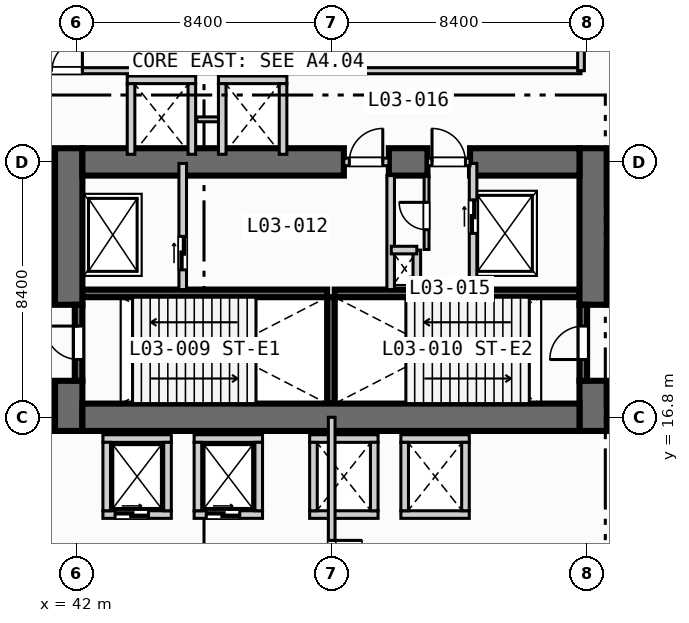
"""IFC4 building model, lengths in metres.
Left out: names, types, materials, properties, quantities, classifications, styles, units other than length and angle.
Written with IfcOpenShell. Run it as: python <this file> out.ifc"""

import sys

from ifc_helpers import new_model, si_unit, direction, frame, frame_2d, origin, place, context, subcontext, project, spatial, rectangle, extrude, element, fill, save


model = new_model("IFC4")
c1 = context("Model", 3, precision=1e-05, world=origin(), true_north=direction((0.0, 1.0)))
c2 = subcontext(c1, "Body", "Model", "MODEL_VIEW")
j1 = project(units=[si_unit("LENGTHUNIT", "METRE"), si_unit("PLANEANGLEUNIT", "RADIAN")], contexts=[c1])
p1 = place(None, origin())
s1 = spatial("IfcSite", under=j1, at=p1, CompositionType="ELEMENT")
p2 = place(p1, origin())
s2 = spatial("IfcBuilding", under=s1, at=p2, CompositionType="ELEMENT")
p3 = place(p2, frame((0.0, 0.0, 15.6)))
s3 = spatial("IfcBuildingStorey", under=s2, at=p3, CompositionType="ELEMENT", Elevation=15.6)
for number, where, z_axis, x_axis in (
    (1, (42.2, 20.875, 0.0), (0.0, 0.0, 1.0), (1.0, 0.0, 0.0)),
    (2, (50.5, 20.875, 0.0), (0.0, 0.0, 1.0), (1.0, 0.0, 0.0)),
):
    element("IfcWall", number, at=place(p3, frame(where, z_axis=z_axis, x_axis=x_axis)), inside=s3, PredefinedType="SOLIDWALL", context=c2, shape_type="SweptSolid", body=[
        extrude(rectangle(XDim=8.05, YDim=0.25, at=frame_2d((4.025, 0.0))), origin(), (0.0, 0.0, 1.0), 4.85),
    ])
p4 = place(p3, frame((50.375, 17.25, 0.0), z_axis=(0.0, 0.0, 1.0), x_axis=(0.0, 1.0, 0.0)))
e3 = element("IfcWall", 3, at=p4, inside=s3, PredefinedType="SOLIDWALL", context=c2, shape_type="SweptSolid", body=[
    extrude(rectangle(XDim=3.5, YDim=0.25, at=frame_2d((1.75, 0.0))), origin(), (0.0, 0.0, 1.0), 4.85),
])
p5 = place(p3, frame((41.75, 16.35, 0.0), z_axis=(0.0, 0.0, 1.0), x_axis=(0.0, 1.0, 0.0)))
e4 = element("IfcWall", 4, at=p5, inside=s3, PredefinedType="SHEAR", context=c2, shape_type="SweptSolid", body=[
    extrude(rectangle(XDim=1.65, YDim=0.9, at=frame_2d((0.825, 0.0))), origin(), (0.0, 0.0, 1.0), 4.85),
])
p6 = place(p3, frame((41.75, 20.5, 0.0), z_axis=(0.0, 0.0, 1.0), x_axis=(0.0, 1.0, 0.0)))
e5 = element("IfcWall", 5, at=p6, inside=s3, PredefinedType="SHEAR", context=c2, shape_type="SweptSolid", body=[
    extrude(rectangle(XDim=5.15, YDim=0.9, at=frame_2d((2.575, 0.0))), origin(), (0.0, 0.0, 1.0), 4.85),
])
p7 = place(p3, frame((59.0, 16.35, 0.0), z_axis=(0.0, 0.0, 1.0), x_axis=(0.0, 1.0, 0.0)))
e6 = element("IfcWall", 6, at=p7, inside=s3, PredefinedType="SHEAR", context=c2, shape_type="SweptSolid", body=[
    extrude(rectangle(XDim=1.65, YDim=0.9, at=frame_2d((0.825, 0.0))), origin(), (0.0, 0.0, 1.0), 4.85),
])
p8 = place(p3, frame((59.0, 20.5, 0.0), z_axis=(0.0, 0.0, 1.0), x_axis=(0.0, 1.0, 0.0)))
e7 = element("IfcWall", 7, at=p8, inside=s3, PredefinedType="SHEAR", context=c2, shape_type="SweptSolid", body=[
    extrude(rectangle(XDim=5.15, YDim=0.9, at=frame_2d((2.575, 0.0))), origin(), (0.0, 0.0, 1.0), 4.85),
])
p9 = place(p3, frame((42.2, 16.8, 0.0), z_axis=(0.0, 0.0, 1.0), x_axis=(1.0, 0.0, 0.0)))
e8 = element("IfcWall", 8, at=p9, inside=s3, PredefinedType="SHEAR", context=c2, shape_type="SweptSolid", body=[
    extrude(rectangle(XDim=16.35, YDim=0.9, at=frame_2d((8.175, 0.0))), origin(), (0.0, 0.0, 1.0), 4.85),
])
p10 = place(p3, frame((42.2, 25.2, 0.0), z_axis=(0.0, 0.0, 1.0), x_axis=(1.0, 0.0, 0.0)))
e9 = element("IfcWall", 9, at=p10, inside=s3, PredefinedType="SHEAR", context=c2, shape_type="SweptSolid", body=[
    extrude(rectangle(XDim=8.6, YDim=0.9, at=frame_2d((4.3, 0.0))), origin(), (0.0, 0.0, 1.0), 4.85),
])
p11 = place(p3, frame((52.28, 25.2, 0.0), z_axis=(0.0, 0.0, 1.0), x_axis=(1.0, 0.0, 0.0)))
e10 = element("IfcWall", 10, at=p11, inside=s3, PredefinedType="SHEAR", context=c2, shape_type="SweptSolid", body=[
    extrude(rectangle(XDim=1.27, YDim=0.9, at=frame_2d((0.635, 0.0))), origin(), (0.0, 0.0, 1.0), 4.85),
])
p12 = place(p3, frame((54.95, 25.2, 0.0), z_axis=(0.0, 0.0, 1.0), x_axis=(1.0, 0.0, 0.0)))
e11 = element("IfcWall", 11, at=p12, inside=s3, PredefinedType="SHEAR", context=c2, shape_type="SweptSolid", body=[
    extrude(rectangle(XDim=3.6, YDim=0.9, at=frame_2d((1.8, 0.0))), origin(), (0.0, 0.0, 1.0), 4.85),
])
p13 = place(p3, frame((42.075, 18.0, 0.0), z_axis=(0.0, 0.0, 1.0), x_axis=(0.0, 1.0, 0.0)))
e12 = element("IfcWall", 12, at=p13, inside=s3, PredefinedType="SOLIDWALL", context=c2, shape_type="SweptSolid", body=[
    extrude(rectangle(XDim=2.5, YDim=0.25, at=frame_2d((1.25, 0.0))), origin(), (0.0, 0.0, 1.0), 4.85),
])
p14 = place(p13, frame((0.7, 0.0, 0.0)))
e13 = element("IfcOpeningElement", 13, at=p14, cuts=e12, PredefinedType="OPENING", context=c2, shape_type="SweptSolid", body=[
    extrude(rectangle(XDim=1.1, YDim=2.15, at=frame_2d((0.55, 1.075))), frame((0.0, 0.135, 0.0), z_axis=(0.0, -1.0, 0.0), x_axis=(1.0, 0.0, 0.0)), (0.0, 0.0, 1.0), 0.27),
])
p15 = place(p3, frame((58.675, 18.0, 0.0), z_axis=(0.0, 0.0, 1.0), x_axis=(0.0, 1.0, 0.0)))
e14 = element("IfcWall", 14, at=p15, inside=s3, PredefinedType="SOLIDWALL", context=c2, shape_type="SweptSolid", body=[
    extrude(rectangle(XDim=2.5, YDim=0.25, at=frame_2d((1.25, 0.0))), origin(), (0.0, 0.0, 1.0), 4.85),
])
p16 = place(p15, frame((0.7, 0.0, 0.0)))
e15 = element("IfcOpeningElement", 15, at=p16, cuts=e14, PredefinedType="OPENING", context=c2, shape_type="SweptSolid", body=[
    extrude(rectangle(XDim=1.1, YDim=2.15, at=frame_2d((0.55, 1.075))), frame((0.0, 0.135, 0.0), z_axis=(0.0, -1.0, 0.0), x_axis=(1.0, 0.0, 0.0)), (0.0, 0.0, 1.0), 0.27),
])
p17 = place(p3, frame((45.5, 21.0, 0.0), z_axis=(0.0, 0.0, 1.0), x_axis=(0.0, 1.0, 0.0)))
e16 = element("IfcWall", 16, at=p17, inside=s3, PredefinedType="SOLIDWALL", context=c2, shape_type="SweptSolid", body=[
    extrude(rectangle(XDim=4.15, YDim=0.25, at=frame_2d((2.075, 0.0))), origin(), (0.0, 0.0, 1.0), 4.85),
])
p18 = place(p17, frame((0.65, 0.0, 0.0)))
e17 = element("IfcOpeningElement", 17, at=p18, cuts=e16, PredefinedType="OPENING", context=c2, shape_type="SweptSolid", body=[
    extrude(rectangle(XDim=1.1, YDim=2.15, at=frame_2d((0.55, 1.075))), frame((0.0, 0.135, 0.0), z_axis=(0.0, -1.0, 0.0), x_axis=(1.0, 0.0, 0.0)), (0.0, 0.0, 1.0), 0.27),
])
p19 = place(p3, frame((50.8, 25.2, 0.0), z_axis=(0.0, 0.0, 1.0), x_axis=(1.0, 0.0, 0.0)))
e18 = element("IfcWall", 18, at=p19, inside=s3, PredefinedType="SOLIDWALL", context=c2, shape_type="SweptSolid", body=[
    extrude(rectangle(XDim=1.48, YDim=0.25, at=frame_2d((0.74, 0.0))), origin(), (0.0, 0.0, 1.0), 4.85),
])
p20 = place(p19, frame((0.18, 0.0, 0.0)))
e19 = element("IfcOpeningElement", 19, at=p20, cuts=e18, PredefinedType="OPENING", context=c2, shape_type="SweptSolid", body=[
    extrude(rectangle(XDim=1.1, YDim=2.15, at=frame_2d((0.55, 1.075))), frame((0.0, 0.135, 0.0), z_axis=(0.0, -1.0, 0.0), x_axis=(1.0, 0.0, 0.0)), (0.0, 0.0, 1.0), 0.27),
])
p21 = place(p3, frame((52.34, 21.0, 0.0), z_axis=(0.0, 0.0, 1.0), x_axis=(0.0, 1.0, 0.0)))
e20 = element("IfcWall", 20, at=p21, inside=s3, PredefinedType="SOLIDWALL", context=c2, shape_type="SweptSolid", body=[
    extrude(rectangle(XDim=3.75, YDim=0.25, at=frame_2d((1.875, 0.0))), origin(), (0.0, 0.0, 1.0), 4.85),
])
p22 = place(p3, frame((55.05, 21.0, 0.0), z_axis=(0.0, 0.0, 1.0), x_axis=(0.0, 1.0, 0.0)))
e21 = element("IfcWall", 21, at=p22, inside=s3, PredefinedType="SOLIDWALL", context=c2, shape_type="SweptSolid", body=[
    extrude(rectangle(XDim=4.15, YDim=0.25, at=frame_2d((2.075, 0.0))), origin(), (0.0, 0.0, 1.0), 4.85),
])
p23 = place(p22, frame((1.85, 0.0, 0.0)))
e22 = element("IfcOpeningElement", 22, at=p23, cuts=e21, PredefinedType="OPENING", context=c2, shape_type="SweptSolid", body=[
    extrude(rectangle(XDim=1.1, YDim=2.15, at=frame_2d((0.55, 1.075))), frame((0.0, 0.135, 0.0), z_axis=(0.0, -1.0, 0.0), x_axis=(1.0, 0.0, 0.0)), (0.0, 0.0, 1.0), 0.27),
])
p24 = place(p3, frame((53.55, 25.2, 0.0), z_axis=(0.0, 0.0, 1.0), x_axis=(1.0, 0.0, 0.0)))
e23 = element("IfcWall", 23, at=p24, inside=s3, PredefinedType="SOLIDWALL", context=c2, shape_type="SweptSolid", body=[
    extrude(rectangle(XDim=1.4, YDim=0.25, at=frame_2d((0.7, 0.0))), origin(), (0.0, 0.0, 1.0), 4.85),
])
p25 = place(p24, frame((0.15, 0.0, 0.0)))
e24 = element("IfcOpeningElement", 24, at=p25, cuts=e23, PredefinedType="OPENING", context=c2, shape_type="SweptSolid", body=[
    extrude(rectangle(XDim=1.1, YDim=2.15, at=frame_2d((0.55, 1.075))), frame((0.0, 0.135, 0.0), z_axis=(0.0, -1.0, 0.0), x_axis=(1.0, 0.0, 0.0)), (0.0, 0.0, 1.0), 0.27),
])
p26 = place(p3, frame((53.2, 21.0, 0.0), z_axis=(0.0, 0.0, 1.0), x_axis=(0.0, 1.0, 0.0)))
e25 = element("IfcWall", 25, at=p26, inside=s3, PredefinedType="SOLIDWALL", context=c2, shape_type="SweptSolid", body=[
    extrude(rectangle(XDim=1.3, YDim=0.25, at=frame_2d((0.65, 0.0))), origin(), (0.0, 0.0, 1.0), 4.85),
])
p27 = place(p3, frame((52.36, 22.3, 0.0), z_axis=(0.0, 0.0, 1.0), x_axis=(1.0, 0.0, 0.0)))
e26 = element("IfcWall", 26, at=p27, inside=s3, PredefinedType="SOLIDWALL", context=c2, shape_type="SweptSolid", body=[
    extrude(rectangle(XDim=0.84, YDim=0.25, at=frame_2d((0.42, 0.0))), origin(), (0.0, 0.0, 1.0), 4.85),
])
p28 = place(p3, frame((53.52, 22.32, 0.0), z_axis=(0.0, 0.0, 1.0), x_axis=(0.0, 1.0, 0.0)))
e27 = element("IfcWall", 27, at=p28, inside=s3, PredefinedType="PARTITIONING", context=c2, shape_type="SweptSolid", body=[
    extrude(rectangle(XDim=2.4, YDim=0.16, at=frame_2d((1.2, 0.0))), origin(), (0.0, 0.0, 1.0), 4.85),
])
p29 = place(p28, frame((0.65, 0.0, 0.0)))
e28 = element("IfcOpeningElement", 28, at=p29, cuts=e27, PredefinedType="OPENING", context=c2, shape_type="SweptSolid", body=[
    extrude(rectangle(XDim=0.9, YDim=2.1, at=frame_2d((0.45, 1.05))), frame((0.0, 0.09, 0.0), z_axis=(0.0, -1.0, 0.0), x_axis=(1.0, 0.0, 0.0)), (0.0, 0.0, 1.0), 0.18),
])
p30 = place(p3, frame((42.875, 13.6, 0.0), z_axis=(0.0, 0.0, 1.0), x_axis=(1.0, 0.0, 0.0)))
e29 = element("IfcWall", 29, at=p30, inside=s3, PredefinedType="SOLIDWALL", context=c2, shape_type="SweptSolid", body=[
    extrude(rectangle(XDim=2.25, YDim=0.25, at=frame_2d((1.125, 0.0))), origin(), (0.0, 0.0, 1.0), 4.85),
])
p31 = place(p30, frame((0.4, 0.0, 0.0)))
e30 = element("IfcOpeningElement", 30, at=p31, cuts=e29, PredefinedType="OPENING", context=c2, shape_type="SweptSolid", body=[
    extrude(rectangle(XDim=1.1, YDim=2.15, at=frame_2d((0.55, 1.075))), frame((0.0, 0.135, 0.0), z_axis=(0.0, -1.0, 0.0), x_axis=(1.0, 0.0, 0.0)), (0.0, 0.0, 1.0), 0.27),
])
for number, where, z_axis, x_axis in (
    (31, (42.875, 16.1, 0.0), (0.0, 0.0, 1.0), (1.0, 0.0, 0.0)),
    (32, (43.0, 13.725, 0.0), (0.0, 0.0, 1.0), (0.0, 1.0, 0.0)),
    (33, (45.0, 13.725, 0.0), (0.0, 0.0, 1.0), (0.0, 1.0, 0.0)),
):
    element("IfcWall", number, at=place(p3, frame(where, z_axis=z_axis, x_axis=x_axis)), inside=s3, PredefinedType="SOLIDWALL", context=c2, shape_type="SweptSolid", body=[
        extrude(rectangle(XDim=2.25, YDim=0.25, at=frame_2d((1.125, 0.0))), origin(), (0.0, 0.0, 1.0), 4.85),
    ])
p32 = place(p3, frame((45.875, 13.6, 0.0), z_axis=(0.0, 0.0, 1.0), x_axis=(1.0, 0.0, 0.0)))
e34 = element("IfcWall", 34, at=p32, inside=s3, PredefinedType="SOLIDWALL", context=c2, shape_type="SweptSolid", body=[
    extrude(rectangle(XDim=2.25, YDim=0.25, at=frame_2d((1.125, 0.0))), origin(), (0.0, 0.0, 1.0), 4.85),
])
p33 = place(p32, frame((0.4, 0.0, 0.0)))
e35 = element("IfcOpeningElement", 35, at=p33, cuts=e34, PredefinedType="OPENING", context=c2, shape_type="SweptSolid", body=[
    extrude(rectangle(XDim=1.1, YDim=2.15, at=frame_2d((0.55, 1.075))), frame((0.0, 0.135, 0.0), z_axis=(0.0, -1.0, 0.0), x_axis=(1.0, 0.0, 0.0)), (0.0, 0.0, 1.0), 0.27),
])
for number, where, z_axis, x_axis in (
    (36, (45.875, 16.1, 0.0), (0.0, 0.0, 1.0), (1.0, 0.0, 0.0)),
    (37, (46.0, 13.725, 0.0), (0.0, 0.0, 1.0), (0.0, 1.0, 0.0)),
    (38, (48.0, 13.725, 0.0), (0.0, 0.0, 1.0), (0.0, 1.0, 0.0)),
    (39, (49.675, 13.6, 0.0), (0.0, 0.0, 1.0), (1.0, 0.0, 0.0)),
    (40, (49.675, 16.1, 0.0), (0.0, 0.0, 1.0), (1.0, 0.0, 0.0)),
    (41, (49.8, 13.725, 0.0), (0.0, 0.0, 1.0), (0.0, 1.0, 0.0)),
    (42, (51.8, 13.725, 0.0), (0.0, 0.0, 1.0), (0.0, 1.0, 0.0)),
    (43, (52.675, 13.6, 0.0), (0.0, 0.0, 1.0), (1.0, 0.0, 0.0)),
    (44, (52.675, 16.1, 0.0), (0.0, 0.0, 1.0), (1.0, 0.0, 0.0)),
    (45, (52.8, 13.725, 0.0), (0.0, 0.0, 1.0), (0.0, 1.0, 0.0)),
    (46, (54.8, 13.725, 0.0), (0.0, 0.0, 1.0), (0.0, 1.0, 0.0)),
    (47, (43.675, 27.9, 0.0), (0.0, 0.0, 1.0), (1.0, 0.0, 0.0)),
):
    element("IfcWall", number, at=place(p3, frame(where, z_axis=z_axis, x_axis=x_axis)), inside=s3, PredefinedType="SOLIDWALL", context=c2, shape_type="SweptSolid", body=[
        extrude(rectangle(XDim=2.25, YDim=0.25, at=frame_2d((1.125, 0.0))), origin(), (0.0, 0.0, 1.0), 4.85),
    ])
for number, where, z_axis, x_axis in (
    (48, (43.8, 25.45, 0.0), (0.0, 0.0, 1.0), (0.0, 1.0, 0.0)),
    (49, (45.8, 25.45, 0.0), (0.0, 0.0, 1.0), (0.0, 1.0, 0.0)),
):
    element("IfcWall", number, at=place(p3, frame(where, z_axis=z_axis, x_axis=x_axis)), inside=s3, PredefinedType="SOLIDWALL", context=c2, shape_type="SweptSolid", body=[
        extrude(rectangle(XDim=2.325, YDim=0.25, at=frame_2d((1.163, 0.0))), origin(), (0.0, 0.0, 1.0), 4.85),
    ])
p34 = place(p3, frame((45.96, 26.6, 0.0), z_axis=(0.0, 0.0, 1.0), x_axis=(1.0, 0.0, 0.0)))
e50 = element("IfcWall", 50, at=p34, inside=s3, PredefinedType="PARTITIONING", context=c2, shape_type="SweptSolid", body=[
    extrude(rectangle(XDim=0.88, YDim=0.16, at=frame_2d((0.44, 0.0))), origin(), (0.0, 0.0, 1.0), 4.85),
])
p35 = place(p3, frame((46.675, 27.9, 0.0), z_axis=(0.0, 0.0, 1.0), x_axis=(1.0, 0.0, 0.0)))
e51 = element("IfcWall", 51, at=p35, inside=s3, PredefinedType="SOLIDWALL", context=c2, shape_type="SweptSolid", body=[
    extrude(rectangle(XDim=2.25, YDim=0.25, at=frame_2d((1.125, 0.0))), origin(), (0.0, 0.0, 1.0), 4.85),
])
for number, where, z_axis, x_axis in (
    (52, (46.8, 25.45, 0.0), (0.0, 0.0, 1.0), (0.0, 1.0, 0.0)),
    (53, (48.8, 25.45, 0.0), (0.0, 0.0, 1.0), (0.0, 1.0, 0.0)),
):
    element("IfcWall", number, at=place(p3, frame(where, z_axis=z_axis, x_axis=x_axis)), inside=s3, PredefinedType="SOLIDWALL", context=c2, shape_type="SweptSolid", body=[
        extrude(rectangle(XDim=2.325, YDim=0.25, at=frame_2d((1.163, 0.0))), origin(), (0.0, 0.0, 1.0), 4.85),
    ])
p36 = place(p3, frame((50.4, 0.35, 0.0), z_axis=(0.0, 0.0, 1.0), x_axis=(0.0, 1.0, 0.0)))
e54 = element("IfcWall", 54, at=p36, inside=s3, PredefinedType="PARTITIONING", context=c2, shape_type="SweptSolid", body=[
    extrude(rectangle(XDim=16.45, YDim=0.22, at=frame_2d((8.225, 0.0))), origin(), (0.0, 0.0, 1.0), 4.0),
])
p37 = place(p36, frame((3.2, 0.0, 0.0)))
e55 = element("IfcOpeningElement", 55, at=p37, cuts=e54, PredefinedType="OPENING", context=c2, shape_type="SweptSolid", body=[
    extrude(rectangle(XDim=2.0, YDim=2.15, at=frame_2d((1.0, 1.075))), frame((0.0, 0.12, 0.0), z_axis=(0.0, -1.0, 0.0), x_axis=(1.0, 0.0, 0.0)), (0.0, 0.0, 1.0), 0.24),
])
p38 = place(p36, frame((10.4, 0.0, 0.0)))
e56 = element("IfcOpeningElement", 56, at=p38, cuts=e54, PredefinedType="OPENING", context=c2, shape_type="SweptSolid", body=[
    extrude(rectangle(XDim=2.0, YDim=2.15, at=frame_2d((1.0, 1.075))), frame((0.0, 0.12, 0.0), z_axis=(0.0, -1.0, 0.0), x_axis=(1.0, 0.0, 0.0)), (0.0, 0.0, 1.0), 0.24),
])
p39 = place(p3, frame((34.2, 28.2, 0.0), z_axis=(0.0, 0.0, 1.0), x_axis=(1.0, 0.0, 0.0)))
e57 = element("IfcWall", 57, at=p39, inside=s3, PredefinedType="PARTITIONING", context=c2, shape_type="SweptSolid", body=[
    extrude(rectangle(XDim=24.4, YDim=0.2, at=frame_2d((12.2, 0.0))), origin(), (0.0, 0.0, 1.0), 4.85),
])
p40 = place(p39, frame((6.0, 0.0, 0.0)))
e58 = element("IfcOpeningElement", 58, at=p40, cuts=e57, PredefinedType="OPENING", context=c2, shape_type="SweptSolid", body=[
    extrude(rectangle(XDim=2.0, YDim=2.15, at=frame_2d((1.0, 1.075))), frame((0.0, 0.11, 0.0), z_axis=(0.0, -1.0, 0.0), x_axis=(1.0, 0.0, 0.0)), (0.0, 0.0, 1.0), 0.22),
])
p41 = place(p3, frame((58.6, 28.2, 0.0), z_axis=(0.0, 0.0, 1.0), x_axis=(0.0, 1.0, 0.0)))
e59 = element("IfcWall", 59, at=p41, inside=s3, PredefinedType="PARTITIONING", context=c2, shape_type="SweptSolid", body=[
    extrude(rectangle(XDim=13.4, YDim=0.22, at=frame_2d((6.7, 0.0))), origin(), (0.0, 0.0, 1.0), 3.86),
])
p42 = place(p14, origin())
e60 = element("IfcDoor", 60, at=p42, inside=s3, OperationType="SINGLE_SWING_RIGHT", PredefinedType="DOOR", context=c2, shape_type="SweptSolid", body=[
    extrude(rectangle(XDim=1.1, YDim=2.15, at=frame_2d((0.55, 1.075))), frame((0.0, 0.025, 0.0), z_axis=(0.0, -1.0, 0.0), x_axis=(1.0, 0.0, 0.0)), (0.0, 0.0, 1.0), 0.05),
])
fill(e13, e60)
p43 = place(p16, origin())
e61 = element("IfcDoor", 61, at=p43, inside=s3, OperationType="SINGLE_SWING_LEFT", PredefinedType="DOOR", context=c2, shape_type="SweptSolid", body=[
    extrude(rectangle(XDim=1.1, YDim=2.15, at=frame_2d((0.55, 1.075))), frame((0.0, 0.025, 0.0), z_axis=(0.0, -1.0, 0.0), x_axis=(1.0, 0.0, 0.0)), (0.0, 0.0, 1.0), 0.05),
])
fill(e15, e61)
p44 = place(p18, origin())
e62 = element("IfcDoor", 62, at=p44, inside=s3, OperationType="SLIDING_TO_LEFT", PredefinedType="DOOR", context=c2, shape_type="SweptSolid", body=[
    extrude(rectangle(XDim=1.1, YDim=2.15, at=frame_2d((0.55, 1.075))), frame((0.0, 0.025, 0.0), z_axis=(0.0, -1.0, 0.0), x_axis=(1.0, 0.0, 0.0)), (0.0, 0.0, 1.0), 0.05),
])
fill(e17, e62)
p45 = place(p20, origin())
e63 = element("IfcDoor", 63, at=p45, inside=s3, OperationType="SINGLE_SWING_RIGHT", PredefinedType="DOOR", context=c2, shape_type="SweptSolid", body=[
    extrude(rectangle(XDim=1.1, YDim=2.15, at=frame_2d((0.55, 1.075))), frame((0.0, 0.025, 0.0), z_axis=(0.0, -1.0, 0.0), x_axis=(1.0, 0.0, 0.0)), (0.0, 0.0, 1.0), 0.05),
])
fill(e19, e63)
p46 = place(p23, origin())
e64 = element("IfcDoor", 64, at=p46, inside=s3, OperationType="SLIDING_TO_LEFT", PredefinedType="DOOR", context=c2, shape_type="SweptSolid", body=[
    extrude(rectangle(XDim=1.1, YDim=2.15, at=frame_2d((0.55, 1.075))), frame((0.0, 0.025, 0.0), z_axis=(0.0, -1.0, 0.0), x_axis=(1.0, 0.0, 0.0)), (0.0, 0.0, 1.0), 0.05),
])
fill(e22, e64)
p47 = place(p25, origin())
e65 = element("IfcDoor", 65, at=p47, inside=s3, OperationType="SINGLE_SWING_LEFT", PredefinedType="DOOR", context=c2, shape_type="SweptSolid", body=[
    extrude(rectangle(XDim=1.1, YDim=2.15, at=frame_2d((0.55, 1.075))), frame((0.0, 0.025, 0.0), z_axis=(0.0, -1.0, 0.0), x_axis=(1.0, 0.0, 0.0)), (0.0, 0.0, 1.0), 0.05),
])
fill(e24, e65)
p48 = place(p29, origin())
e66 = element("IfcDoor", 66, at=p48, inside=s3, OperationType="SINGLE_SWING_RIGHT", PredefinedType="DOOR", context=c2, shape_type="SweptSolid", body=[
    extrude(rectangle(XDim=0.9, YDim=2.1, at=frame_2d((0.45, 1.05))), frame((0.0, 0.025, 0.0), z_axis=(0.0, -1.0, 0.0), x_axis=(1.0, 0.0, 0.0)), (0.0, 0.0, 1.0), 0.05),
])
fill(e28, e66)
p49 = place(p31, origin())
e67 = element("IfcDoor", 67, at=p49, inside=s3, OperationType="SLIDING_TO_LEFT", PredefinedType="DOOR", context=c2, shape_type="SweptSolid", body=[
    extrude(rectangle(XDim=1.1, YDim=2.15, at=frame_2d((0.55, 1.075))), frame((0.0, 0.025, 0.0), z_axis=(0.0, -1.0, 0.0), x_axis=(1.0, 0.0, 0.0)), (0.0, 0.0, 1.0), 0.05),
])
fill(e30, e67)
p50 = place(p33, origin())
e68 = element("IfcDoor", 68, at=p50, inside=s3, OperationType="SLIDING_TO_LEFT", PredefinedType="DOOR", context=c2, shape_type="SweptSolid", body=[
    extrude(rectangle(XDim=1.1, YDim=2.15, at=frame_2d((0.55, 1.075))), frame((0.0, 0.025, 0.0), z_axis=(0.0, -1.0, 0.0), x_axis=(1.0, 0.0, 0.0)), (0.0, 0.0, 1.0), 0.05),
])
fill(e35, e68)
p51 = place(p38, origin())
e69 = element("IfcDoor", 69, at=p51, inside=s3, OperationType="SINGLE_SWING_RIGHT", PredefinedType="DOOR", context=c2, shape_type="SweptSolid", body=[
    extrude(rectangle(XDim=2.0, YDim=2.15, at=frame_2d((1.0, 1.075))), frame((0.0, 0.025, 0.0), z_axis=(0.0, -1.0, 0.0), x_axis=(1.0, 0.0, 0.0)), (0.0, 0.0, 1.0), 0.05),
])
fill(e56, e69)
p52 = place(p40, origin())
e70 = element("IfcDoor", 70, at=p52, inside=s3, OperationType="SINGLE_SWING_LEFT", PredefinedType="DOOR", context=c2, shape_type="SweptSolid", body=[
    extrude(rectangle(XDim=2.0, YDim=2.15, at=frame_2d((1.0, 1.075))), frame((0.0, 0.025, 0.0), z_axis=(0.0, -1.0, 0.0), x_axis=(1.0, 0.0, 0.0)), (0.0, 0.0, 1.0), 0.05),
])
fill(e58, e70)
save(model, sys.argv[1])
